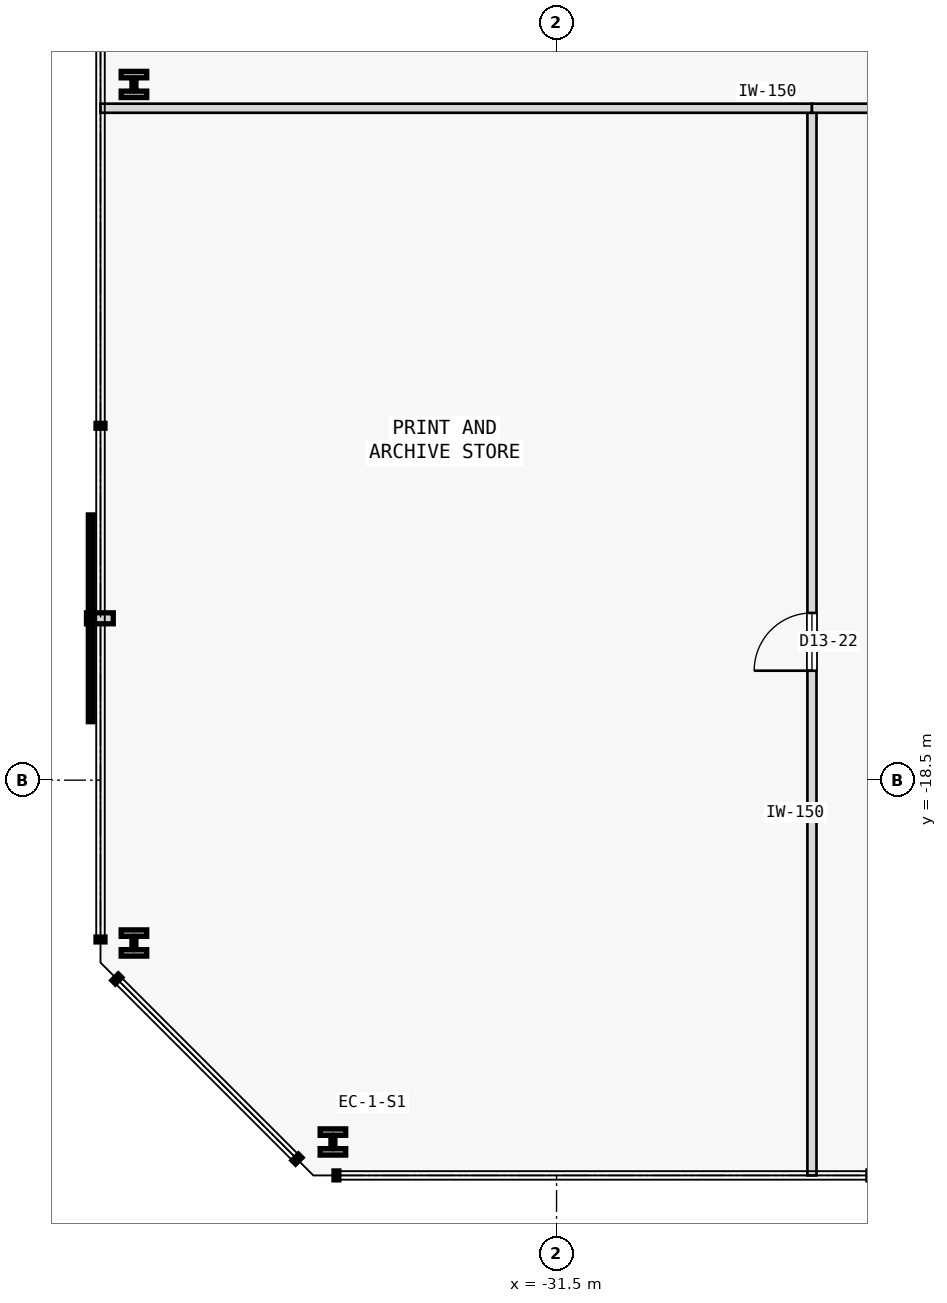
"""IFC4 building model, lengths in metres.
Left out: names, types, materials, properties, quantities, classifications, styles, units other than length and angle.
Written with IfcOpenShell. Run it as: python <this file> out.ifc"""

import sys

from ifc_helpers import new_model, si_unit, direction, frame, frame_2d, origin, origin_2d, place, context, subcontext, project, spatial, rectangle, i_section, extrude, element, fill, save


model = new_model("IFC4")
c1 = context("Model", 3, precision=1e-05, world=origin(), true_north=direction((0.0, 1.0)))
c2 = subcontext(c1, "Body", "Model", "MODEL_VIEW")
j1 = project(units=[si_unit("LENGTHUNIT", "METRE"), si_unit("PLANEANGLEUNIT", "RADIAN")], contexts=[c1])
p1 = place(None, origin())
s1 = spatial("IfcSite", under=j1, at=p1, CompositionType="ELEMENT")
p2 = place(p1, origin())
s2 = spatial("IfcBuilding", under=s1, at=p2, CompositionType="ELEMENT")
p3 = place(p2, frame((0.0, 0.0, 56.0)))
s3 = spatial("IfcBuildingStorey", under=s2, at=p3, CompositionType="ELEMENT", Elevation=56.0)
for number, where, z_axis, x_axis in (
    (1, (-35.178, -24.45, 0.0), (0.0, 0.0, 1.0), (1.0, 0.0, 0.0)),
    (2, (-38.45, -7.059, 0.0), (0.0, 0.0, 1.0), (1.0, 0.0, 0.0)),
    (3, (-38.45, -21.178, 0.0), (0.0, 0.0, 1.0), (1.0, 0.0, 0.0)),
):
    element("IfcColumn", number, at=place(p3, frame(where, z_axis=z_axis, x_axis=x_axis)), inside=s3, PredefinedType="COLUMN", context=c2, shape_type="SweptSolid", body=[
        extrude(i_section(OverallWidth=0.42, OverallDepth=0.431, WebThickness=0.065, FlangeThickness=0.106, FilletRadius=0.015, at=origin_2d()), origin(), (0.0, 0.0, 1.0), 3.8),
    ])
p4 = place(p3, frame((-27.3, -25.0, 0.0), z_axis=(0.0, 0.0, 1.0), x_axis=(0.0, 1.0, 0.0)))
e4 = element("IfcWall", 4, at=p4, inside=s3, PredefinedType="PARTITIONING", context=c2, shape_type="SweptSolid", body=[
    extrude(rectangle(XDim=17.55, YDim=0.15, at=frame_2d((8.775, 0.0))), origin(), (0.0, 0.0, 1.0), 3.575),
])
p5 = place(p4, frame((8.3, 0.0, 0.0)))
e5 = element("IfcOpeningElement", 5, at=p5, cuts=e4, PredefinedType="OPENING", context=c2, shape_type="SweptSolid", body=[
    extrude(rectangle(XDim=0.95, YDim=2.15, at=frame_2d((0.475, 1.075))), frame((0.0, 0.085, 0.0), z_axis=(0.0, -1.0, 0.0), x_axis=(1.0, 0.0, 0.0)), (0.0, 0.0, 1.0), 0.17),
])
p6 = place(p3, frame((-39.0, -7.45, 0.0), z_axis=(0.0, 0.0, 1.0), x_axis=(1.0, 0.0, 0.0)))
e6 = element("IfcWall", 6, at=p6, inside=s3, PredefinedType="PARTITIONING", context=c2, shape_type="SweptSolid", body=[
    extrude(rectangle(XDim=11.7, YDim=0.15, at=frame_2d((5.85, 0.0))), origin(), (0.0, 0.0, 1.0), 3.575),
])
p7 = place(p3, frame((-27.3, -7.45, 0.0), z_axis=(0.0, 0.0, 1.0), x_axis=(1.0, 0.0, 0.0)))
e7 = element("IfcWall", 7, at=p7, inside=s3, PredefinedType="PARTITIONING", context=c2, shape_type="SweptSolid", body=[
    extrude(rectangle(XDim=10.241, YDim=0.15, at=frame_2d((5.121, 0.0))), origin(), (0.0, 0.0, 1.0), 3.575),
])
p8 = place(p5, origin())
e8 = element("IfcDoor", 8, at=p8, inside=s3, OperationType="SINGLE_SWING_LEFT", PredefinedType="DOOR", context=c2, shape_type="SweptSolid", body=[
    extrude(rectangle(XDim=0.95, YDim=2.15, at=frame_2d((0.475, 1.075))), frame((0.0, 0.025, 0.0), z_axis=(0.0, -1.0, 0.0), x_axis=(1.0, 0.0, 0.0)), (0.0, 0.0, 1.0), 0.05),
])
fill(e5, e8)
save(model, sys.argv[1])
